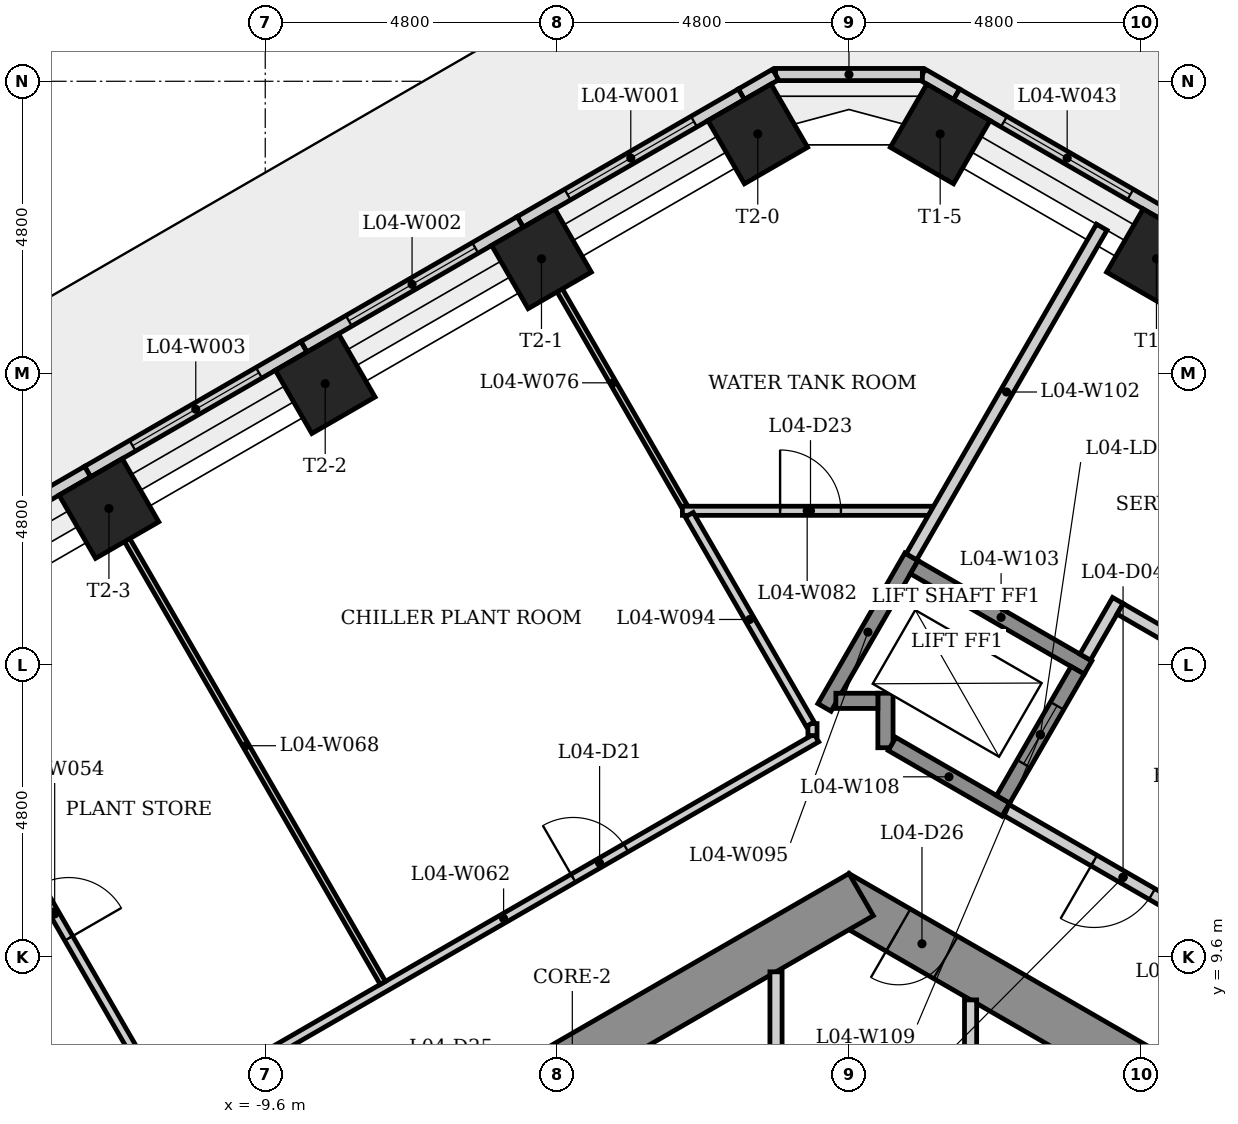
"""IFC4 building model, lengths in metres.
Left out: names, types, materials, properties, quantities, classifications, styles, units other than length and angle.
Written with IfcOpenShell. Run it as: python <this file> out.ifc"""

import sys

from ifc_helpers import new_model, si_unit, direction, frame, frame_2d, origin, origin_2d, place, context, subcontext, project, spatial, rectangle, extrude, element, fill, save


model = new_model("IFC4")
c1 = context("Model", 3, precision=1e-05, world=origin(), true_north=direction((0.0, 1.0)))
c2 = subcontext(c1, "Body", "Model", "MODEL_VIEW")
j1 = project(units=[si_unit("LENGTHUNIT", "METRE"), si_unit("PLANEANGLEUNIT", "RADIAN")], contexts=[c1])
p1 = place(None, origin())
s1 = spatial("IfcSite", under=j1, at=p1, CompositionType="ELEMENT")
p2 = place(p1, origin())
s2 = spatial("IfcBuilding", under=s1, at=p2, CompositionType="ELEMENT")
p3 = place(p2, frame((0.0, 0.0, 20.5)))
s3 = spatial("IfcBuildingStorey", under=s2, at=p3, CompositionType="ELEMENT", Elevation=20.5)
p4 = place(p3, frame((9.3, 5.138, 0.0), z_axis=(0.0, 0.0, 1.0), x_axis=(-0.866023993627, 0.500002442456, 0.0)))
e1 = element("IfcWall", 1, at=p4, inside=s3, PredefinedType="SHEAR", context=c2, shape_type="SweptSolid", body=[
    extrude(rectangle(XDim=10.97, YDim=0.8, at=frame_2d((5.485, 0.0))), origin(), (0.0, 0.0, 1.0), 5.0),
])
p5 = place(p4, frame((8.903, 0.0, 0.0)))
e2 = element("IfcOpeningElement", 2, at=p5, cuts=e1, PredefinedType="OPENING", context=c2, shape_type="SweptSolid", body=[
    extrude(rectangle(XDim=0.9, YDim=2.1, at=frame_2d((0.45, 1.05))), frame((0.0, 0.41, 0.0), z_axis=(0.0, -1.0, 0.0), x_axis=(1.0, 0.0, 0.0)), (0.0, 0.0, 1.0), 0.82),
])
p6 = place(p4, frame((2.269, 0.0, 0.0)))
e3 = element("IfcOpeningElement", 3, at=p6, cuts=e1, PredefinedType="OPENING", context=c2, shape_type="SweptSolid", body=[
    extrude(rectangle(XDim=0.9, YDim=2.1, at=frame_2d((0.45, 1.05))), frame((0.0, 0.41, 0.0), z_axis=(0.0, -1.0, 0.0), x_axis=(1.0, 0.0, 0.0)), (0.0, 0.0, 1.0), 0.82),
])
p7 = place(p3, frame((0.2, 10.623, 0.0), z_axis=(0.0, 0.0, 1.0), x_axis=(-0.866023993627, -0.500002442456, 0.0)))
e4 = element("IfcWall", 4, at=p7, inside=s3, PredefinedType="SHEAR", context=c2, shape_type="SweptSolid", body=[
    extrude(rectangle(XDim=10.97, YDim=0.8, at=frame_2d((5.485, 0.0))), origin(), (0.0, 0.0, 1.0), 5.0),
])
p8 = place(p7, frame((7.339, 0.0, 0.0)))
e5 = element("IfcOpeningElement", 5, at=p8, cuts=e4, PredefinedType="OPENING", context=c2, shape_type="SweptSolid", body=[
    extrude(rectangle(XDim=0.9, YDim=2.1, at=frame_2d((0.45, 1.05))), frame((0.0, 0.41, 0.0), z_axis=(0.0, -1.0, 0.0), x_axis=(1.0, 0.0, 0.0)), (0.0, 0.0, 1.0), 0.82),
])
for number, where, z_axis, x_axis in (
    (6, (5.057, 21.08, 0.0), (0.0, 0.0, 1.0), (0.5, 0.866, 0.0)),
    (7, (1.5, 23.134, 0.0), (0.0, 0.0, 1.0), (0.5, 0.866, 0.0)),
    (8, (-1.5, 23.134, 0.0), (0.0, 0.0, 1.0), (-0.5, 0.866, 0.0)),
    (9, (-5.057, 21.08, 0.0), (0.0, 0.0, 1.0), (-0.5, 0.866, 0.0)),
    (10, (-8.614, 19.027, 0.0), (0.0, 0.0, 1.0), (-0.5, 0.866, 0.0)),
    (11, (-12.171, 16.973, 0.0), (0.0, 0.0, 1.0), (-0.5, 0.866, 0.0)),
):
    element("IfcColumn", number, at=place(p3, frame(where, z_axis=z_axis, x_axis=x_axis)), inside=s3, PredefinedType="COLUMN", context=c2, shape_type="SweptSolid", body=[
        extrude(rectangle(XDim=1.2, YDim=1.2, at=origin_2d()), origin(), (0.0, 0.0, 1.0), 5.0),
    ])
p9 = place(p3, frame((-1.77, 23.786, 0.0), z_axis=(0.0, 0.0, 1.0), x_axis=(-0.866016145416, -0.500016035621, 0.0)))
e12 = element("IfcWall", 12, at=p9, inside=s3, PredefinedType="SOLIDWALL", context=c2, shape_type="SweptSolid", body=[
    extrude(rectangle(XDim=4.199, YDim=0.2, at=frame_2d((2.1, 0.0))), origin(), (0.0, 0.0, 1.0), 4.88),
])
p10 = place(p9, frame((0.899, 0.0, 0.8)))
e13 = element("IfcOpeningElement", 13, at=p10, cuts=e12, PredefinedType="OPENING", context=c2, shape_type="SweptSolid", body=[
    extrude(rectangle(XDim=2.4, YDim=2.4, at=frame_2d((1.2, 1.2))), frame((0.0, 0.11, 0.0), z_axis=(0.0, -1.0, 0.0), x_axis=(1.0, 0.0, 0.0)), (0.0, 0.0, 1.0), 0.22),
])
p11 = place(p3, frame((-5.407, 21.687, 0.0), z_axis=(0.0, 0.0, 1.0), x_axis=(-0.866029215606, -0.499993397673, 0.0)))
e14 = element("IfcWall", 14, at=p11, inside=s3, PredefinedType="SOLIDWALL", context=c2, shape_type="SweptSolid", body=[
    extrude(rectangle(XDim=4.108, YDim=0.2, at=frame_2d((2.054, 0.0))), origin(), (0.0, 0.0, 1.0), 4.88),
])
p12 = place(p11, frame((0.854, 0.0, 0.8)))
e15 = element("IfcOpeningElement", 15, at=p12, cuts=e14, PredefinedType="OPENING", context=c2, shape_type="SweptSolid", body=[
    extrude(rectangle(XDim=2.4, YDim=2.4, at=frame_2d((1.2, 1.2))), frame((0.0, 0.11, 0.0), z_axis=(0.0, -1.0, 0.0), x_axis=(1.0, 0.0, 0.0)), (0.0, 0.0, 1.0), 0.22),
])
p13 = place(p3, frame((-8.964, 19.633, 0.0), z_axis=(0.0, 0.0, 1.0), x_axis=(-0.866021252249, -0.500007190601, 0.0)))
e16 = element("IfcWall", 16, at=p13, inside=s3, PredefinedType="SOLIDWALL", context=c2, shape_type="SweptSolid", body=[
    extrude(rectangle(XDim=4.107, YDim=0.2, at=frame_2d((2.053, 0.0))), origin(), (0.0, 0.0, 1.0), 4.88),
])
p14 = place(p13, frame((0.854, 0.0, 0.8)))
e17 = element("IfcOpeningElement", 17, at=p14, cuts=e16, PredefinedType="OPENING", context=c2, shape_type="SweptSolid", body=[
    extrude(rectangle(XDim=2.4, YDim=2.4, at=frame_2d((1.2, 1.2))), frame((0.0, 0.11, 0.0), z_axis=(0.0, -1.0, 0.0), x_axis=(1.0, 0.0, 0.0)), (0.0, 0.0, 1.0), 0.22),
])
p15 = place(p3, frame((-12.521, 17.579, 0.0), z_axis=(0.0, 0.0, 1.0), x_axis=(-0.866036113234, -0.499981450231, 0.0)))
e18 = element("IfcWall", 18, at=p15, inside=s3, PredefinedType="SOLIDWALL", context=c2, shape_type="SweptSolid", body=[
    extrude(rectangle(XDim=4.107, YDim=0.2, at=frame_2d((2.054, 0.0))), origin(), (0.0, 0.0, 1.0), 4.88),
])
p16 = place(p15, frame((0.854, 0.0, 0.8)))
e19 = element("IfcOpeningElement", 19, at=p16, cuts=e18, PredefinedType="OPENING", context=c2, shape_type="SweptSolid", body=[
    extrude(rectangle(XDim=2.4, YDim=2.4, at=frame_2d((1.2, 1.2))), frame((0.0, 0.11, 0.0), z_axis=(0.0, -1.0, 0.0), x_axis=(1.0, 0.0, 0.0)), (0.0, 0.0, 1.0), 0.22),
])
p17 = place(p3, frame((5.407, 21.687, 0.0), z_axis=(0.0, 0.0, 1.0), x_axis=(-0.866016145416, 0.500016035621, 0.0)))
e20 = element("IfcWall", 20, at=p17, inside=s3, PredefinedType="SOLIDWALL", context=c2, shape_type="SweptSolid", body=[
    extrude(rectangle(XDim=4.199, YDim=0.2, at=frame_2d((2.1, 0.0))), origin(), (0.0, 0.0, 1.0), 4.88),
])
p18 = place(p17, frame((0.9, 0.0, 0.8)))
e21 = element("IfcOpeningElement", 21, at=p18, cuts=e20, PredefinedType="OPENING", context=c2, shape_type="SweptSolid", body=[
    extrude(rectangle(XDim=2.4, YDim=2.4, at=frame_2d((1.2, 1.2))), frame((0.0, 0.11, 0.0), z_axis=(0.0, -1.0, 0.0), x_axis=(1.0, 0.0, 0.0)), (0.0, 0.0, 1.0), 0.22),
])
p19 = place(p3, frame((1.77, 23.786, 0.0), z_axis=(0.0, 0.0, 1.0), x_axis=(-0.866085525409, 0.49989585183, 0.0)))
e22 = element("IfcWall", 22, at=p19, inside=s3, PredefinedType="SOLIDWALL", context=c2, shape_type="SweptSolid", body=[
    extrude(rectangle(XDim=0.65, YDim=0.2, at=frame_2d((0.325, 0.0))), origin(), (0.0, 0.0, 1.0), 4.88),
])
p20 = place(p3, frame((1.207, 24.111, 0.0), z_axis=(0.0, 0.0, 1.0), x_axis=(-1.0, 0.0, 0.0)))
e23 = element("IfcWall", 23, at=p20, inside=s3, PredefinedType="SOLIDWALL", context=c2, shape_type="SweptSolid", body=[
    extrude(rectangle(XDim=2.415, YDim=0.2, at=frame_2d((1.207, 0.0))), origin(), (0.0, 0.0, 1.0), 4.88),
])
p21 = place(p3, frame((-1.207, 24.111, 0.0), z_axis=(0.0, 0.0, 1.0), x_axis=(-0.866085525409, -0.49989585183, 0.0)))
e24 = element("IfcWall", 24, at=p21, inside=s3, PredefinedType="SOLIDWALL", context=c2, shape_type="SweptSolid", body=[
    extrude(rectangle(XDim=0.65, YDim=0.2, at=frame_2d((0.325, 0.0))), origin(), (0.0, 0.0, 1.0), 4.88),
])
p22 = place(p3, frame((-14.683, 13.11, 0.0), z_axis=(0.0, 0.0, 1.0), x_axis=(0.500005126634, -0.866022443901, 0.0)))
e25 = element("IfcWall", 25, at=p22, inside=s3, PredefinedType="PARTITIONING", context=c2, shape_type="SweptSolid", body=[
    extrude(rectangle(XDim=6.479, YDim=0.15, at=frame_2d((3.24, 0.0))), origin(), (0.0, 0.0, 1.0), 4.65),
])
p23 = place(p22, frame((2.702, 0.0, 0.0)))
e26 = element("IfcOpeningElement", 26, at=p23, cuts=e25, PredefinedType="OPENING", context=c2, shape_type="SweptSolid", body=[
    extrude(rectangle(XDim=1.0, YDim=2.1, at=frame_2d((0.5, 1.05))), frame((0.0, 0.085, 0.0), z_axis=(0.0, -1.0, 0.0), x_axis=(1.0, 0.0, 0.0)), (0.0, 0.0, 1.0), 0.17),
])
p24 = place(p3, frame((-10.825, 7.26, 0.0), z_axis=(0.0, 0.0, 1.0), x_axis=(0.866026819738, 0.499997547488, 0.0)))
e27 = element("IfcWall", 27, at=p24, inside=s3, PredefinedType="PARTITIONING", context=c2, shape_type="SweptSolid", body=[
    extrude(rectangle(XDim=11.882, YDim=0.15, at=frame_2d((5.941, 0.0))), origin(), (0.0, 0.0, 1.0), 4.65),
])
p25 = place(p24, frame((7.264, 0.0, 0.0)))
e28 = element("IfcOpeningElement", 28, at=p25, cuts=e27, PredefinedType="OPENING", context=c2, shape_type="SweptSolid", body=[
    extrude(rectangle(XDim=1.0, YDim=2.1, at=frame_2d((0.5, 1.05))), frame((0.0, 0.085, 0.0), z_axis=(0.0, -1.0, 0.0), x_axis=(1.0, 0.0, 0.0)), (0.0, 0.0, 1.0), 0.17),
])
p26 = place(p3, frame((-7.666, 9.171, 0.0), z_axis=(0.0, 0.0, 1.0), x_axis=(-0.500009404554, 0.866019973994, 0.0)))
e29 = element("IfcWall", 29, at=p26, inside=s3, PredefinedType="PARTITIONING", context=c2, shape_type="SweptSolid", body=[
    extrude(rectangle(XDim=9.01, YDim=0.1, at=frame_2d((4.505, 0.0))), origin(), (0.0, 0.0, 1.0), 4.65),
])
p27 = place(p3, frame((-5.057, 21.08, 0.0), z_axis=(0.0, 0.0, 1.0), x_axis=(0.500018540756, -0.866014699009, 0.0)))
e30 = element("IfcWall", 30, at=p27, inside=s3, PredefinedType="PARTITIONING", context=c2, shape_type="SweptSolid", body=[
    extrude(rectangle(XDim=4.711, YDim=0.1, at=frame_2d((2.355, 0.0))), origin(), (0.0, 0.0, 1.0), 4.65),
])
p28 = place(p3, frame((-2.739, 16.936, 0.0), z_axis=(0.0, 0.0, 1.0), x_axis=(1.0, 0.0, 0.0)))
e31 = element("IfcWall", 31, at=p28, inside=s3, PredefinedType="PARTITIONING", context=c2, shape_type="SweptSolid", body=[
    extrude(rectangle(XDim=4.103, YDim=0.15, at=frame_2d((2.052, 0.0))), origin(), (0.0, 0.0, 1.0), 4.65),
])
p29 = place(p28, frame((1.606, 0.0, 0.0)))
e32 = element("IfcOpeningElement", 32, at=p29, cuts=e31, PredefinedType="OPENING", context=c2, shape_type="SweptSolid", body=[
    extrude(rectangle(XDim=1.0, YDim=2.1, at=frame_2d((0.5, 1.05))), frame((0.0, 0.085, 0.0), z_axis=(0.0, -1.0, 0.0), x_axis=(1.0, 0.0, 0.0)), (0.0, 0.0, 1.0), 0.17),
])
p30 = place(p3, frame((-1.2, 9.353, 0.0), z_axis=(0.0, 0.0, 1.0), x_axis=(0.0, -1.0, 0.0)))
e33 = element("IfcWall", 33, at=p30, inside=s3, PredefinedType="PARTITIONING", context=c2, shape_type="SweptSolid", body=[
    extrude(rectangle(XDim=4.078, YDim=0.2, at=frame_2d((2.039, 0.0))), origin(), (0.0, 0.0, 1.0), 4.65),
])
p31 = place(p3, frame((-0.6, 13.239, 0.0), z_axis=(0.0, 0.0, 1.0), x_axis=(0.0, 1.0, 0.0)))
e34 = element("IfcWall", 34, at=p31, inside=s3, PredefinedType="PARTITIONING", context=c2, shape_type="SweptSolid", body=[
    extrude(rectangle(XDim=0.197, YDim=0.15, at=frame_2d((0.099, 0.0))), origin(), (0.0, 0.0, 1.0), 4.65),
])
p32 = place(p3, frame((-0.637, 13.426, 0.0), z_axis=(0.0, 0.0, 1.0), x_axis=(-0.500046503579, 0.865998553266, 0.0)))
e35 = element("IfcWall", 35, at=p32, inside=s3, PredefinedType="PARTITIONING", context=c2, shape_type="SweptSolid", body=[
    extrude(rectangle(XDim=3.978, YDim=0.15, at=frame_2d((1.989, 0.0))), origin(), (0.0, 0.0, 1.0), 4.65),
])
p33 = place(p3, frame((-0.403, 13.702, 0.0), z_axis=(0.0, 0.0, 1.0), x_axis=(0.499976111731, 0.866039195244, 0.0)))
e36 = element("IfcWall", 36, at=p33, inside=s3, PredefinedType="SHEAR", context=c2, shape_type="SweptSolid", body=[
    extrude(rectangle(XDim=2.861, YDim=0.25, at=frame_2d((1.43, 0.0))), origin(), (0.0, 0.0, 1.0), 4.65),
])
p34 = place(p3, frame((0.6, 13.039, 0.0), z_axis=(0.0, 0.0, 1.0), x_axis=(0.0, 1.0, 0.0)))
e37 = element("IfcWall", 37, at=p34, inside=s3, PredefinedType="SHEAR", context=c2, shape_type="SweptSolid", body=[
    extrude(rectangle(XDim=0.896, YDim=0.25, at=frame_2d((0.448, 0.0))), origin(), (0.0, 0.0, 1.0), 4.65),
])
p35 = place(p3, frame((0.475, 13.81, 0.0), z_axis=(0.0, 0.0, 1.0), x_axis=(-1.0, 0.0, 0.0)))
e38 = element("IfcWall", 38, at=p35, inside=s3, PredefinedType="SHEAR", context=c2, shape_type="SweptSolid", body=[
    extrude(rectangle(XDim=0.691, YDim=0.25, at=frame_2d((0.345, 0.0))), origin(), (0.0, 0.0, 1.0), 5.0),
])
p36 = place(p3, frame((1.027, 16.179, 0.0), z_axis=(0.0, 0.0, 1.0), x_axis=(0.499998165157, 0.866026463129, 0.0)))
e39 = element("IfcWall", 39, at=p36, inside=s3, PredefinedType="PLUMBINGWALL", context=c2, shape_type="SweptSolid", body=[
    extrude(rectangle(XDim=6.26, YDim=0.2, at=frame_2d((3.13, 0.0))), origin(), (0.0, 0.0, 1.0), 4.65),
])
p37 = place(p3, frame((1.073, 16.008, 0.0), z_axis=(0.0, 0.0, 1.0), x_axis=(0.866040211805, -0.499974350878, 0.0)))
e40 = element("IfcWall", 40, at=p37, inside=s3, PredefinedType="SHEAR", context=c2, shape_type="SweptSolid", body=[
    extrude(rectangle(XDim=3.3, YDim=0.25, at=frame_2d((1.65, 0.0))), origin(), (0.0, 0.0, 1.0), 4.65),
])
p38 = place(p3, frame((2.0, 8.891, 0.0), z_axis=(0.0, 0.0, 1.0), x_axis=(0.0, -1.0, 0.0)))
e41 = element("IfcWall", 41, at=p38, inside=s3, PredefinedType="PARTITIONING", context=c2, shape_type="SweptSolid", body=[
    extrude(rectangle(XDim=3.616, YDim=0.2, at=frame_2d((1.808, 0.0))), origin(), (0.0, 0.0, 1.0), 4.65),
])
p39 = place(p3, frame((2.581, 12.02, 0.0), z_axis=(0.0, 0.0, 1.0), x_axis=(-0.86603892542, 0.499976579108, 0.0)))
e42 = element("IfcWall", 42, at=p39, inside=s3, PredefinedType="SHEAR", context=c2, shape_type="SweptSolid", body=[
    extrude(rectangle(XDim=2.162, YDim=0.25, at=frame_2d((1.081, 0.0))), origin(), (0.0, 0.0, 1.0), 4.65),
])
p40 = place(p3, frame((2.535, 12.191, 0.0), z_axis=(0.0, 0.0, 1.0), x_axis=(0.500061746146, 0.865989751695, 0.0)))
e43 = element("IfcWall", 43, at=p40, inside=s3, PredefinedType="SHEAR", context=c2, shape_type="SweptSolid", body=[
    extrude(rectangle(XDim=2.45, YDim=0.25, at=frame_2d((1.225, 0.0))), origin(), (0.0, 0.0, 1.0), 5.0),
])
p41 = place(p40, frame((0.675, 0.0, 0.0)))
e44 = element("IfcOpeningElement", 44, at=p41, cuts=e43, PredefinedType="OPENING", context=c2, shape_type="SweptSolid", body=[
    extrude(rectangle(XDim=1.1, YDim=2.1, at=frame_2d((0.55, 1.05))), frame((0.0, 0.135, 0.0), z_axis=(0.0, -1.0, 0.0), x_axis=(1.0, 0.0, 0.0)), (0.0, 0.0, 1.0), 0.27),
])
p42 = place(p3, frame((3.885, 14.529, 0.0), z_axis=(0.0, 0.0, 1.0), x_axis=(0.499997628298, 0.866026773083, 0.0)))
e45 = element("IfcWall", 45, at=p42, inside=s3, PredefinedType="PLUMBINGWALL", context=c2, shape_type="SweptSolid", body=[
    extrude(rectangle(XDim=1.075, YDim=0.2, at=frame_2d((0.538, 0.0))), origin(), (0.0, 0.0, 1.0), 4.65),
])
p43 = place(p3, frame((4.459, 15.323, 0.0), z_axis=(0.0, 0.0, 1.0), x_axis=(0.866016039709, -0.500016218704, 0.0)))
e46 = element("IfcWall", 46, at=p43, inside=s3, PredefinedType="PLUMBINGWALL", context=c2, shape_type="SweptSolid", body=[
    extrude(rectangle(XDim=4.7, YDim=0.2, at=frame_2d((2.35, 0.0))), origin(), (0.0, 0.0, 1.0), 4.65),
])
p44 = place(p3, frame((6.435, 9.795, 0.0), z_axis=(0.0, 0.0, 1.0), x_axis=(-0.866012907634, 0.500021643343, 0.0)))
e47 = element("IfcWall", 47, at=p44, inside=s3, PredefinedType="PARTITIONING", context=c2, shape_type="SweptSolid", body=[
    extrude(rectangle(XDim=4.45, YDim=0.2, at=frame_2d((2.225, 0.0))), origin(), (0.0, 0.0, 1.0), 4.65),
])
p45 = place(p44, frame((1.675, 0.0, 0.0)))
e48 = element("IfcOpeningElement", 48, at=p45, cuts=e47, PredefinedType="OPENING", context=c2, shape_type="SweptSolid", body=[
    extrude(rectangle(XDim=1.1, YDim=2.1, at=frame_2d((0.55, 1.05))), frame((0.0, 0.11, 0.0), z_axis=(0.0, -1.0, 0.0), x_axis=(1.0, 0.0, 0.0)), (0.0, 0.0, 1.0), 0.22),
])
p46 = place(p10, origin())
e49 = element("IfcWindow", 49, at=p46, inside=s3, PartitioningType="SINGLE_PANEL", PredefinedType="WINDOW", context=c2, shape_type="SweptSolid", body=[
    extrude(rectangle(XDim=2.4, YDim=2.4, at=frame_2d((1.2, 1.2))), frame((0.0, 0.03, 0.0), z_axis=(0.0, -1.0, 0.0), x_axis=(1.0, 0.0, 0.0)), (0.0, 0.0, 1.0), 0.06),
])
fill(e13, e49)
p47 = place(p12, origin())
e50 = element("IfcWindow", 50, at=p47, inside=s3, PartitioningType="SINGLE_PANEL", PredefinedType="WINDOW", context=c2, shape_type="SweptSolid", body=[
    extrude(rectangle(XDim=2.4, YDim=2.4, at=frame_2d((1.2, 1.2))), frame((0.0, 0.03, 0.0), z_axis=(0.0, -1.0, 0.0), x_axis=(1.0, 0.0, 0.0)), (0.0, 0.0, 1.0), 0.06),
])
fill(e15, e50)
p48 = place(p14, origin())
e51 = element("IfcWindow", 51, at=p48, inside=s3, PartitioningType="SINGLE_PANEL", PredefinedType="WINDOW", context=c2, shape_type="SweptSolid", body=[
    extrude(rectangle(XDim=2.4, YDim=2.4, at=frame_2d((1.2, 1.2))), frame((0.0, 0.03, 0.0), z_axis=(0.0, -1.0, 0.0), x_axis=(1.0, 0.0, 0.0)), (0.0, 0.0, 1.0), 0.06),
])
fill(e17, e51)
p49 = place(p18, origin())
e52 = element("IfcWindow", 52, at=p49, inside=s3, PartitioningType="SINGLE_PANEL", PredefinedType="WINDOW", context=c2, shape_type="SweptSolid", body=[
    extrude(rectangle(XDim=2.4, YDim=2.4, at=frame_2d((1.2, 1.2))), frame((0.0, 0.03, 0.0), z_axis=(0.0, -1.0, 0.0), x_axis=(1.0, 0.0, 0.0)), (0.0, 0.0, 1.0), 0.06),
])
fill(e21, e52)
p50 = place(p45, origin())
e53 = element("IfcDoor", 53, at=p50, inside=s3, OperationType="SINGLE_SWING_RIGHT", PredefinedType="DOOR", context=c2, shape_type="SweptSolid", body=[
    extrude(rectangle(XDim=1.1, YDim=2.1, at=frame_2d((0.55, 1.05))), frame((0.0, 0.025, 0.0), z_axis=(0.0, -1.0, 0.0), x_axis=(1.0, 0.0, 0.0)), (0.0, 0.0, 1.0), 0.05),
])
fill(e48, e53)
p51 = place(p41, origin())
e54 = element("IfcDoor", 54, at=p51, inside=s3, OperationType="SLIDING_TO_LEFT", PredefinedType="DOOR", context=c2, shape_type="SweptSolid", body=[
    extrude(rectangle(XDim=1.1, YDim=2.1, at=frame_2d((0.55, 1.05))), frame((0.0, 0.025, 0.0), z_axis=(0.0, -1.0, 0.0), x_axis=(1.0, 0.0, 0.0)), (0.0, 0.0, 1.0), 0.05),
])
fill(e44, e54)
p52 = place(p25, origin())
e55 = element("IfcDoor", 55, at=p52, inside=s3, OperationType="SINGLE_SWING_LEFT", PredefinedType="DOOR", context=c2, shape_type="SweptSolid", body=[
    extrude(rectangle(XDim=1.0, YDim=2.1, at=frame_2d((0.5, 1.05))), frame((0.0, 0.025, 0.0), z_axis=(0.0, -1.0, 0.0), x_axis=(1.0, 0.0, 0.0)), (0.0, 0.0, 1.0), 0.05),
])
fill(e28, e55)
p53 = place(p23, origin())
e56 = element("IfcDoor", 56, at=p53, inside=s3, OperationType="SINGLE_SWING_RIGHT", PredefinedType="DOOR", context=c2, shape_type="SweptSolid", body=[
    extrude(rectangle(XDim=1.0, YDim=2.1, at=frame_2d((0.5, 1.05))), frame((0.0, 0.025, 0.0), z_axis=(0.0, -1.0, 0.0), x_axis=(1.0, 0.0, 0.0)), (0.0, 0.0, 1.0), 0.05),
])
fill(e26, e56)
p54 = place(p29, origin())
e57 = element("IfcDoor", 57, at=p54, inside=s3, OperationType="SINGLE_SWING_LEFT", PredefinedType="DOOR", context=c2, shape_type="SweptSolid", body=[
    extrude(rectangle(XDim=1.0, YDim=2.1, at=frame_2d((0.5, 1.05))), frame((0.0, 0.025, 0.0), z_axis=(0.0, -1.0, 0.0), x_axis=(1.0, 0.0, 0.0)), (0.0, 0.0, 1.0), 0.05),
])
fill(e32, e57)
p55 = place(p5, origin())
e58 = element("IfcDoor", 58, at=p55, inside=s3, OperationType="SINGLE_SWING_RIGHT", PredefinedType="DOOR", context=c2, shape_type="SweptSolid", body=[
    extrude(rectangle(XDim=0.9, YDim=2.1, at=frame_2d((0.45, 1.05))), frame((0.0, 0.025, 0.0), z_axis=(0.0, -1.0, 0.0), x_axis=(1.0, 0.0, 0.0)), (0.0, 0.0, 1.0), 0.05),
])
fill(e2, e58)
save(model, sys.argv[1])
